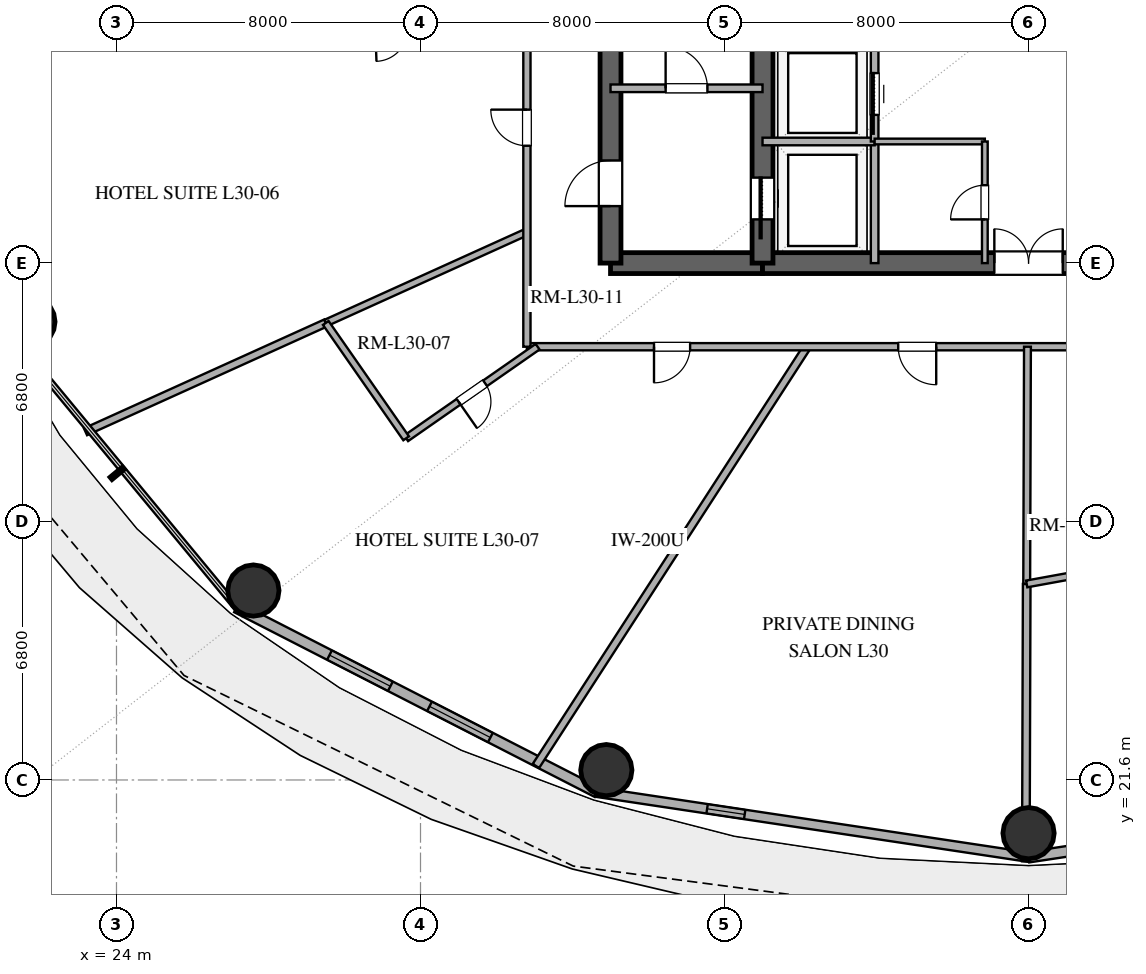
"""IFC4 building model, lengths in metres.
Left out: names, types, materials, properties, quantities, classifications, styles, units other than length and angle.
Written with IfcOpenShell. Run it as: python <this file> out.ifc"""

import sys

from ifc_helpers import new_model, si_unit, direction, frame, frame_2d, origin, origin_2d, place, context, subcontext, project, spatial, rectangle, hollow_circle, extrude, element, fill, save


model = new_model("IFC4")
c1 = context("Model", 3, precision=1e-05, world=origin(), true_north=direction((0.0, 1.0)))
c2 = subcontext(c1, "Body", "Model", "MODEL_VIEW")
j1 = project(units=[si_unit("LENGTHUNIT", "METRE"), si_unit("PLANEANGLEUNIT", "RADIAN")], contexts=[c1])
p1 = place(None, origin())
s1 = spatial("IfcSite", under=j1, at=p1, CompositionType="ELEMENT")
p2 = place(p1, origin())
s2 = spatial("IfcBuilding", under=s1, at=p2, CompositionType="ELEMENT")
p3 = place(p2, frame((0.0, 0.0, 120.0)))
s3 = spatial("IfcBuildingStorey", under=s2, at=p3, CompositionType="ELEMENT", Elevation=120.0)
p4 = place(p3, frame((37.0, 35.2, 0.0), z_axis=(0.0, 0.0, 1.0), x_axis=(1.0, 0.0, 0.0)))
e1 = element("IfcWall", 1, at=p4, inside=s3, PredefinedType="SHEAR", context=c2, shape_type="SweptSolid", body=[
    extrude(rectangle(XDim=4.0, YDim=0.55, at=frame_2d((2.0, 0.0))), origin(), (0.0, 0.0, 1.0), 3.38),
])
p5 = place(p3, frame((41.0, 35.2, 0.0), z_axis=(0.0, 0.0, 1.0), x_axis=(1.0, 0.0, 0.0)))
e2 = element("IfcWall", 2, at=p5, inside=s3, PredefinedType="SHEAR", context=c2, shape_type="SweptSolid", body=[
    extrude(rectangle(XDim=14.0, YDim=0.55, at=frame_2d((7.0, 0.0))), origin(), (0.0, 0.0, 1.0), 3.38),
])
p6 = place(p5, frame((6.1, 0.0, 0.0)))
e3 = element("IfcOpeningElement", 3, at=p6, cuts=e2, PredefinedType="OPENING", context=c2, shape_type="SweptSolid", body=[
    extrude(rectangle(XDim=1.8, YDim=2.25, at=frame_2d((0.9, 1.125))), frame((0.0, 0.285, 0.0), z_axis=(0.0, -1.0, 0.0), x_axis=(1.0, 0.0, 0.0)), (0.0, 0.0, 1.0), 0.57),
])
p7 = place(p3, frame((37.0, 35.2, 0.0), z_axis=(0.0, 0.0, 1.0), x_axis=(0.0, 1.0, 0.0)))
e4 = element("IfcWall", 4, at=p7, inside=s3, PredefinedType="SHEAR", context=c2, shape_type="SweptSolid", body=[
    extrude(rectangle(XDim=13.6, YDim=0.55, at=frame_2d((6.8, 0.0))), origin(), (0.0, 0.0, 1.0), 3.38),
])
p8 = place(p7, frame((1.5, 0.0, 0.0)))
e5 = element("IfcOpeningElement", 5, at=p8, cuts=e4, PredefinedType="OPENING", context=c2, shape_type="SweptSolid", body=[
    extrude(rectangle(XDim=1.2, YDim=2.15, at=frame_2d((0.6, 1.075))), frame((0.0, 0.285, 0.0), z_axis=(0.0, -1.0, 0.0), x_axis=(1.0, 0.0, 0.0)), (0.0, 0.0, 1.0), 0.57),
])
p9 = place(p3, frame((41.0, 35.2, 0.0), z_axis=(0.0, 0.0, 1.0), x_axis=(0.0, 1.0, 0.0)))
e6 = element("IfcWall", 6, at=p9, inside=s3, PredefinedType="SHEAR", context=c2, shape_type="SweptSolid", body=[
    extrude(rectangle(XDim=13.6, YDim=0.55, at=frame_2d((6.8, 0.0))), origin(), (0.0, 0.0, 1.0), 3.38),
])
p10 = place(p9, frame((1.15, 0.0, 0.0)))
e7 = element("IfcOpeningElement", 7, at=p10, cuts=e6, PredefinedType="OPENING", context=c2, shape_type="SweptSolid", body=[
    extrude(rectangle(XDim=1.1, YDim=2.2, at=frame_2d((0.55, 1.1))), frame((0.0, 0.285, 0.0), z_axis=(0.0, -1.0, 0.0), x_axis=(1.0, 0.0, 0.0)), (0.0, 0.0, 1.0), 0.57),
])
for number, where, z_axis, x_axis in (
    (8, (21.709, 33.657, 0.0), (0.0, 0.0, 1.0), (1.0, 0.0, 0.0)),
    (9, (27.602, 26.585, 0.0), (0.0, 0.0, 1.0), (1.0, 0.0, 0.0)),
    (10, (36.89, 21.859, 0.0), (0.0, 0.0, 1.0), (1.0, 0.0, 0.0)),
    (11, (48.0, 20.2, 0.0), (0.0, 0.0, 1.0), (1.0, 0.0, 0.0)),
):
    element("IfcColumn", number, at=place(p3, frame(where, z_axis=z_axis, x_axis=x_axis)), inside=s3, PredefinedType="COLUMN", context=c2, shape_type="SweptSolid", body=[
        extrude(hollow_circle(Radius=0.675, WallThickness=0.036, at=origin_2d()), origin(), (0.0, 0.0, 1.0), 3.38),
    ])
p11 = place(p3, frame((27.16, 26.14, 0.0), z_axis=(0.0, 0.0, 1.0), x_axis=(0.889959505023, -0.45603955905, 0.0)))
e12 = element("IfcWall", 12, at=p11, inside=s3, PredefinedType="SOLIDWALL", context=c2, shape_type="SweptSolid", body=[
    extrude(rectangle(XDim=10.662, YDim=0.28, at=frame_2d((5.331, 0.0))), origin(), (0.0, 0.0, 1.0), 3.38),
])
p12 = place(p11, frame((2.748, 0.0, 0.85)))
e13 = element("IfcOpeningElement", 13, at=p12, cuts=e12, PredefinedType="OPENING", context=c2, shape_type="SweptSolid", body=[
    extrude(rectangle(XDim=1.8, YDim=2.2, at=frame_2d((0.9, 1.1))), frame((0.0, 0.15, 0.0), z_axis=(0.0, -1.0, 0.0), x_axis=(1.0, 0.0, 0.0)), (0.0, 0.0, 1.0), 0.3),
])
p13 = place(p11, frame((5.705, 0.0, 0.85)))
e14 = element("IfcOpeningElement", 14, at=p13, cuts=e12, PredefinedType="OPENING", context=c2, shape_type="SweptSolid", body=[
    extrude(rectangle(XDim=1.8, YDim=2.2, at=frame_2d((0.9, 1.1))), frame((0.0, 0.15, 0.0), z_axis=(0.0, -1.0, 0.0), x_axis=(1.0, 0.0, 0.0)), (0.0, 0.0, 1.0), 0.3),
])
p14 = place(p3, frame((36.649, 21.277, 0.0), z_axis=(0.0, 0.0, 1.0), x_axis=(0.988877774656, -0.148730450117, 0.0)))
e15 = element("IfcWall", 15, at=p14, inside=s3, PredefinedType="SOLIDWALL", context=c2, shape_type="SweptSolid", body=[
    extrude(rectangle(XDim=11.479, YDim=0.25, at=frame_2d((5.74, 0.0))), origin(), (0.0, 0.0, 1.0), 3.38),
])
p15 = place(p14, frame((2.926, 0.0, 1.42)))
e16 = element("IfcOpeningElement", 16, at=p15, cuts=e15, PredefinedType="OPENING", context=c2, shape_type="SweptSolid", body=[
    extrude(rectangle(XDim=1.0, YDim=1.05, at=frame_2d((0.5, 0.525))), frame((0.0, 0.135, 0.0), z_axis=(0.0, -1.0, 0.0), x_axis=(1.0, 0.0, 0.0)), (0.0, 0.0, 1.0), 0.27),
])
p16 = place(p3, frame((48.0, 19.57, 0.0), z_axis=(0.0, 0.0, 1.0), x_axis=(0.988877774656, 0.148730450117, 0.0)))
e17 = element("IfcWall", 17, at=p16, inside=s3, PredefinedType="SOLIDWALL", context=c2, shape_type="SweptSolid", body=[
    extrude(rectangle(XDim=11.479, YDim=0.28, at=frame_2d((5.74, 0.0))), origin(), (0.0, 0.0, 1.0), 3.38),
])
p17 = place(p16, frame((1.524, 0.0, 0.0)))
e18 = element("IfcOpeningElement", 18, at=p17, cuts=e17, PredefinedType="OPENING", context=c2, shape_type="SweptSolid", body=[
    extrude(rectangle(XDim=1.4, YDim=2.2, at=frame_2d((0.7, 1.1))), frame((0.0, 0.15, 0.0), z_axis=(0.0, -1.0, 0.0), x_axis=(1.0, 0.0, 0.0)), (0.0, 0.0, 1.0), 0.3),
])
p18 = place(p3, frame((37.0, 39.8, 0.0), z_axis=(0.0, 0.0, 1.0), x_axis=(1.0, 0.0, 0.0)))
e19 = element("IfcWall", 19, at=p18, inside=s3, PredefinedType="SOLIDWALL", context=c2, shape_type="SweptSolid", body=[
    extrude(rectangle(XDim=4.0, YDim=0.2, at=frame_2d((2.0, 0.0))), origin(), (0.0, 0.0, 1.0), 2.74),
])
p19 = place(p18, frame((1.45, 0.0, 0.0)))
e20 = element("IfcOpeningElement", 20, at=p19, cuts=e19, PredefinedType="OPENING", context=c2, shape_type="SweptSolid", body=[
    extrude(rectangle(XDim=1.1, YDim=2.15, at=frame_2d((0.55, 1.075))), frame((0.0, 0.11, 0.0), z_axis=(0.0, -1.0, 0.0), x_axis=(1.0, 0.0, 0.0)), (0.0, 0.0, 1.0), 0.22),
])
p20 = place(p3, frame((43.95, 35.2, 0.0), z_axis=(0.0, 0.0, 1.0), x_axis=(0.0, 1.0, 0.0)))
e21 = element("IfcWall", 21, at=p20, inside=s3, PredefinedType="SOLIDWALL", context=c2, shape_type="SweptSolid", body=[
    extrude(rectangle(XDim=3.2, YDim=0.2, at=frame_2d((1.6, 0.0))), origin(), (0.0, 0.0, 1.0), 2.74),
])
p21 = place(p3, frame((41.0, 38.4, 0.0), z_axis=(0.0, 0.0, 1.0), x_axis=(1.0, 0.0, 0.0)))
e22 = element("IfcWall", 22, at=p21, inside=s3, PredefinedType="SOLIDWALL", context=c2, shape_type="SweptSolid", body=[
    extrude(rectangle(XDim=2.95, YDim=0.2, at=frame_2d((1.475, 0.0))), origin(), (0.0, 0.0, 1.0), 2.74),
])
p22 = place(p3, frame((43.95, 38.4, 0.0), z_axis=(0.0, 0.0, 1.0), x_axis=(0.0, 1.0, 0.0)))
e23 = element("IfcWall", 23, at=p22, inside=s3, PredefinedType="SOLIDWALL", context=c2, shape_type="SweptSolid", body=[
    extrude(rectangle(XDim=7.8, YDim=0.2, at=frame_2d((3.9, 0.0))), origin(), (0.0, 0.0, 1.0), 2.74),
])
p23 = place(p22, frame((0.7, 0.0, 0.0)))
e24 = element("IfcOpeningElement", 24, at=p23, cuts=e23, PredefinedType="OPENING", context=c2, shape_type="SweptSolid", body=[
    extrude(rectangle(XDim=1.1, YDim=2.2, at=frame_2d((0.55, 1.1))), frame((0.0, 0.11, 0.0), z_axis=(0.0, -1.0, 0.0), x_axis=(1.0, 0.0, 0.0)), (0.0, 0.0, 1.0), 0.22),
])
p24 = place(p22, frame((3.3, 0.0, 0.0)))
e25 = element("IfcOpeningElement", 25, at=p24, cuts=e23, PredefinedType="OPENING", context=c2, shape_type="SweptSolid", body=[
    extrude(rectangle(XDim=1.1, YDim=2.2, at=frame_2d((0.55, 1.1))), frame((0.0, 0.11, 0.0), z_axis=(0.0, -1.0, 0.0), x_axis=(1.0, 0.0, 0.0)), (0.0, 0.0, 1.0), 0.22),
])
p25 = place(p3, frame((43.95, 38.4, 0.0), z_axis=(0.0, 0.0, 1.0), x_axis=(1.0, 0.0, 0.0)))
e26 = element("IfcWall", 26, at=p25, inside=s3, PredefinedType="PARTITIONING", context=c2, shape_type="SweptSolid", body=[
    extrude(rectangle(XDim=2.9, YDim=0.15, at=frame_2d((1.45, 0.0))), origin(), (0.0, 0.0, 1.0), 2.74),
])
p26 = place(p3, frame((46.85, 35.2, 0.0), z_axis=(0.0, 0.0, 1.0), x_axis=(0.0, 1.0, 0.0)))
e27 = element("IfcWall", 27, at=p26, inside=s3, PredefinedType="PARTITIONING", context=c2, shape_type="SweptSolid", body=[
    extrude(rectangle(XDim=3.2, YDim=0.15, at=frame_2d((1.6, 0.0))), origin(), (0.0, 0.0, 1.0), 2.74),
])
p27 = place(p26, frame((1.15, 0.0, 0.0)))
e28 = element("IfcOpeningElement", 28, at=p27, cuts=e27, PredefinedType="OPENING", context=c2, shape_type="SweptSolid", body=[
    extrude(rectangle(XDim=0.9, YDim=2.15, at=frame_2d((0.45, 1.075))), frame((0.0, 0.085, 0.0), z_axis=(0.0, -1.0, 0.0), x_axis=(1.0, 0.0, 0.0)), (0.0, 0.0, 1.0), 0.17),
])
p28 = place(p3, frame((35.037, 21.969, 0.0), z_axis=(0.0, 0.0, 1.0), x_axis=(0.543298274368, 0.839539745973, 0.0)))
e29 = element("IfcWall", 29, at=p28, inside=s3, PredefinedType="PARTITIONING", context=c2, shape_type="SweptSolid", body=[
    extrude(rectangle(XDim=13.139, YDim=0.2, at=frame_2d((6.57, 0.0))), origin(), (0.0, 0.0, 1.0), 2.74),
])
p29 = place(p3, frame((47.928, 19.461, 0.0), z_axis=(0.0, 0.0, 1.0), x_axis=(0.003178198127, 0.999994949516, 0.0)))
e30 = element("IfcWall", 30, at=p29, inside=s3, PredefinedType="PARTITIONING", context=c2, shape_type="SweptSolid", body=[
    extrude(rectangle(XDim=7.298, YDim=0.2, at=frame_2d((3.649, 0.0))), origin(), (0.0, 0.0, 1.0), 2.74),
])
p30 = place(p3, frame((49.671, 33.0, 0.0), z_axis=(0.0, 0.0, 1.0), x_axis=(-1.0, 0.0, 0.0)))
e31 = element("IfcWall", 31, at=p30, inside=s3, PredefinedType="PARTITIONING", context=c2, shape_type="SweptSolid", body=[
    extrude(rectangle(XDim=14.871, YDim=0.19, at=frame_2d((7.436, 0.0))), origin(), (0.0, 0.0, 1.0), 2.74),
])
p31 = place(p30, frame((10.576, 0.0, 0.0)))
e32 = element("IfcOpeningElement", 32, at=p31, cuts=e31, PredefinedType="OPENING", context=c2, shape_type="SweptSolid", body=[
    extrude(rectangle(XDim=0.95, YDim=2.15, at=frame_2d((0.475, 1.075))), frame((0.0, 0.105, 0.0), z_axis=(0.0, -1.0, 0.0), x_axis=(1.0, 0.0, 0.0)), (0.0, 0.0, 1.0), 0.21),
])
p32 = place(p30, frame((4.101, 0.0, 0.0)))
e33 = element("IfcOpeningElement", 33, at=p32, cuts=e31, PredefinedType="OPENING", context=c2, shape_type="SweptSolid", body=[
    extrude(rectangle(XDim=1.0, YDim=2.2, at=frame_2d((0.5, 1.1))), frame((0.0, 0.105, 0.0), z_axis=(0.0, -1.0, 0.0), x_axis=(1.0, 0.0, 0.0)), (0.0, 0.0, 1.0), 0.21),
])
p33 = place(p3, frame((23.185, 30.762, 0.0), z_axis=(0.0, 0.0, 1.0), x_axis=(0.910940213411, 0.412538395292, 0.0)))
e34 = element("IfcWall", 34, at=p33, inside=s3, PredefinedType="PARTITIONING", context=c2, shape_type="SweptSolid", body=[
    extrude(rectangle(XDim=6.941, YDim=0.2, at=frame_2d((3.47, 0.0))), origin(), (0.0, 0.0, 1.0), 2.74),
])
p34 = place(p3, frame((47.952, 26.758, 0.0), z_axis=(0.0, 0.0, 1.0), x_axis=(0.003168254458, 0.999994981069, 0.0)))
e35 = element("IfcWall", 35, at=p34, inside=s3, PredefinedType="PLUMBINGWALL", context=c2, shape_type="SweptSolid", body=[
    extrude(rectangle(XDim=6.242, YDim=0.18, at=frame_2d((3.121, 0.0))), origin(), (0.0, 0.0, 1.0), 2.74),
])
p35 = place(p3, frame((29.507, 33.625, 0.0), z_axis=(0.0, 0.0, 1.0), x_axis=(0.910959840523, 0.412495053248, 0.0)))
e36 = element("IfcWall", 36, at=p35, inside=s3, PredefinedType="PLUMBINGWALL", context=c2, shape_type="SweptSolid", body=[
    extrude(rectangle(XDim=5.81, YDim=0.18, at=frame_2d((2.905, 0.0))), origin(), (0.0, 0.0, 1.0), 2.74),
])
p36 = place(p3, frame((34.8, 33.0, 0.0), z_axis=(0.0, 0.0, 1.0), x_axis=(0.0, 1.0, 0.0)))
e37 = element("IfcWall", 37, at=p36, inside=s3, PredefinedType="PARTITIONING", context=c2, shape_type="SweptSolid", body=[
    extrude(rectangle(XDim=8.54, YDim=0.19, at=frame_2d((4.27, 0.0))), origin(), (0.0, 0.0, 1.0), 2.74),
])
p37 = place(p36, frame((5.288, 0.0, 0.0)))
e38 = element("IfcOpeningElement", 38, at=p37, cuts=e37, PredefinedType="OPENING", context=c2, shape_type="SweptSolid", body=[
    extrude(rectangle(XDim=0.95, YDim=2.15, at=frame_2d((0.475, 1.075))), frame((0.0, 0.105, 0.0), z_axis=(0.0, -1.0, 0.0), x_axis=(1.0, 0.0, 0.0)), (0.0, 0.0, 1.0), 0.21),
])
p38 = place(p3, frame((35.081, 33.0, 0.0), z_axis=(0.0, 0.0, 1.0), x_axis=(-0.820508449427, -0.571634397512, 0.0)))
e39 = element("IfcWall", 39, at=p38, inside=s3, PredefinedType="PLUMBINGWALL", context=c2, shape_type="SweptSolid", body=[
    extrude(rectangle(XDim=4.216, YDim=0.18, at=frame_2d((2.108, 0.0))), origin(), (0.0, 0.0, 1.0), 2.74),
])
p39 = place(p38, frame((1.683, 0.0, 0.0)))
e40 = element("IfcOpeningElement", 40, at=p39, cuts=e39, PredefinedType="OPENING", context=c2, shape_type="SweptSolid", body=[
    extrude(rectangle(XDim=0.85, YDim=2.1, at=frame_2d((0.425, 1.05))), frame((0.0, 0.1, 0.0), z_axis=(0.0, -1.0, 0.0), x_axis=(1.0, 0.0, 0.0)), (0.0, 0.0, 1.0), 0.2),
])
p40 = place(p3, frame((31.622, 30.59, 0.0), z_axis=(0.0, 0.0, 1.0), x_axis=(-0.571609603384, 0.820525722521, 0.0)))
e41 = element("IfcWall", 41, at=p40, inside=s3, PredefinedType="PLUMBINGWALL", context=c2, shape_type="SweptSolid", body=[
    extrude(rectangle(XDim=3.7, YDim=0.18, at=frame_2d((1.85, 0.0))), origin(), (0.0, 0.0, 1.0), 2.74),
])
p41 = place(p3, frame((50.684, 27.256, 0.0), z_axis=(0.0, 0.0, 1.0), x_axis=(-0.983824875987, -0.17913294892, 0.0)))
e42 = element("IfcWall", 42, at=p41, inside=s3, PredefinedType="PLUMBINGWALL", context=c2, shape_type="SweptSolid", body=[
    extrude(rectangle(XDim=2.778, YDim=0.18, at=frame_2d((1.389, 0.0))), origin(), (0.0, 0.0, 1.0), 2.74),
])
p42 = place(p12, origin())
e43 = element("IfcWindow", 43, at=p42, inside=s3, PartitioningType="SINGLE_PANEL", PredefinedType="WINDOW", context=c2, shape_type="SweptSolid", body=[
    extrude(rectangle(XDim=1.8, YDim=2.2, at=frame_2d((0.9, 1.1))), frame((0.0, 0.03, 0.0), z_axis=(0.0, -1.0, 0.0), x_axis=(1.0, 0.0, 0.0)), (0.0, 0.0, 1.0), 0.06),
])
fill(e13, e43)
p43 = place(p13, origin())
e44 = element("IfcWindow", 44, at=p43, inside=s3, PartitioningType="SINGLE_PANEL", PredefinedType="WINDOW", context=c2, shape_type="SweptSolid", body=[
    extrude(rectangle(XDim=1.8, YDim=2.2, at=frame_2d((0.9, 1.1))), frame((0.0, 0.03, 0.0), z_axis=(0.0, -1.0, 0.0), x_axis=(1.0, 0.0, 0.0)), (0.0, 0.0, 1.0), 0.06),
])
fill(e14, e44)
p44 = place(p15, origin())
e45 = element("IfcWindow", 45, at=p44, inside=s3, PartitioningType="SINGLE_PANEL", PredefinedType="WINDOW", context=c2, shape_type="SweptSolid", body=[
    extrude(rectangle(XDim=1.0, YDim=1.05, at=frame_2d((0.5, 0.525))), frame((0.0, 0.03, 0.0), z_axis=(0.0, -1.0, 0.0), x_axis=(1.0, 0.0, 0.0)), (0.0, 0.0, 1.0), 0.06),
])
fill(e16, e45)
p45 = place(p10, origin())
e46 = element("IfcDoor", 46, at=p45, inside=s3, OperationType="SLIDING_TO_LEFT", PredefinedType="DOOR", context=c2, shape_type="SweptSolid", body=[
    extrude(rectangle(XDim=1.1, YDim=2.2, at=frame_2d((0.55, 1.1))), frame((0.0, 0.025, 0.0), z_axis=(0.0, -1.0, 0.0), x_axis=(1.0, 0.0, 0.0)), (0.0, 0.0, 1.0), 0.05),
])
fill(e7, e46)
p46 = place(p8, origin())
e47 = element("IfcDoor", 47, at=p46, inside=s3, OperationType="SINGLE_SWING_LEFT", PredefinedType="DOOR", context=c2, shape_type="SweptSolid", body=[
    extrude(rectangle(XDim=1.2, YDim=2.15, at=frame_2d((0.6, 1.075))), frame((0.0, 0.025, 0.0), z_axis=(0.0, -1.0, 0.0), x_axis=(1.0, 0.0, 0.0)), (0.0, 0.0, 1.0), 0.05),
])
fill(e5, e47)
p47 = place(p6, origin())
e48 = element("IfcDoor", 48, at=p47, inside=s3, OperationType="DOUBLE_DOOR_SINGLE_SWING", PredefinedType="DOOR", context=c2, shape_type="SweptSolid", body=[
    extrude(rectangle(XDim=1.8, YDim=2.25, at=frame_2d((0.9, 1.125))), frame((0.0, 0.025, 0.0), z_axis=(0.0, -1.0, 0.0), x_axis=(1.0, 0.0, 0.0)), (0.0, 0.0, 1.0), 0.05),
])
fill(e3, e48)
p48 = place(p19, origin())
e49 = element("IfcDoor", 49, at=p48, inside=s3, OperationType="SINGLE_SWING_LEFT", PredefinedType="DOOR", context=c2, shape_type="SweptSolid", body=[
    extrude(rectangle(XDim=1.1, YDim=2.15, at=frame_2d((0.55, 1.075))), frame((0.0, 0.025, 0.0), z_axis=(0.0, -1.0, 0.0), x_axis=(1.0, 0.0, 0.0)), (0.0, 0.0, 1.0), 0.05),
])
fill(e20, e49)
p49 = place(p23, origin())
e50 = element("IfcDoor", 50, at=p49, inside=s3, OperationType="SLIDING_TO_LEFT", PredefinedType="DOOR", context=c2, shape_type="SweptSolid", body=[
    extrude(rectangle(XDim=1.1, YDim=2.2, at=frame_2d((0.55, 1.1))), frame((0.0, 0.025, 0.0), z_axis=(0.0, -1.0, 0.0), x_axis=(1.0, 0.0, 0.0)), (0.0, 0.0, 1.0), 0.05),
])
fill(e24, e50)
p50 = place(p27, origin())
e51 = element("IfcDoor", 51, at=p50, inside=s3, OperationType="SINGLE_SWING_LEFT", PredefinedType="DOOR", context=c2, shape_type="SweptSolid", body=[
    extrude(rectangle(XDim=0.9, YDim=2.15, at=frame_2d((0.45, 1.075))), frame((0.0, 0.025, 0.0), z_axis=(0.0, -1.0, 0.0), x_axis=(1.0, 0.0, 0.0)), (0.0, 0.0, 1.0), 0.05),
])
fill(e28, e51)
p51 = place(p31, origin())
e52 = element("IfcDoor", 52, at=p51, inside=s3, OperationType="SINGLE_SWING_RIGHT", PredefinedType="DOOR", context=c2, shape_type="SweptSolid", body=[
    extrude(rectangle(XDim=0.95, YDim=2.15, at=frame_2d((0.475, 1.075))), frame((0.0, 0.025, 0.0), z_axis=(0.0, -1.0, 0.0), x_axis=(1.0, 0.0, 0.0)), (0.0, 0.0, 1.0), 0.05),
])
fill(e32, e52)
p52 = place(p32, origin())
e53 = element("IfcDoor", 53, at=p52, inside=s3, OperationType="SINGLE_SWING_LEFT", PredefinedType="DOOR", context=c2, shape_type="SweptSolid", body=[
    extrude(rectangle(XDim=1.0, YDim=2.2, at=frame_2d((0.5, 1.1))), frame((0.0, 0.025, 0.0), z_axis=(0.0, -1.0, 0.0), x_axis=(1.0, 0.0, 0.0)), (0.0, 0.0, 1.0), 0.05),
])
fill(e33, e53)
p53 = place(p37, origin())
e54 = element("IfcDoor", 54, at=p53, inside=s3, OperationType="SINGLE_SWING_RIGHT", PredefinedType="DOOR", context=c2, shape_type="SweptSolid", body=[
    extrude(rectangle(XDim=0.95, YDim=2.15, at=frame_2d((0.475, 1.075))), frame((0.0, 0.025, 0.0), z_axis=(0.0, -1.0, 0.0), x_axis=(1.0, 0.0, 0.0)), (0.0, 0.0, 1.0), 0.05),
])
fill(e38, e54)
p54 = place(p39, origin())
e55 = element("IfcDoor", 55, at=p54, inside=s3, OperationType="SINGLE_SWING_RIGHT", PredefinedType="DOOR", context=c2, shape_type="SweptSolid", body=[
    extrude(rectangle(XDim=0.85, YDim=2.1, at=frame_2d((0.425, 1.05))), frame((0.0, 0.025, 0.0), z_axis=(0.0, -1.0, 0.0), x_axis=(1.0, 0.0, 0.0)), (0.0, 0.0, 1.0), 0.05),
])
fill(e40, e55)
save(model, sys.argv[1])
